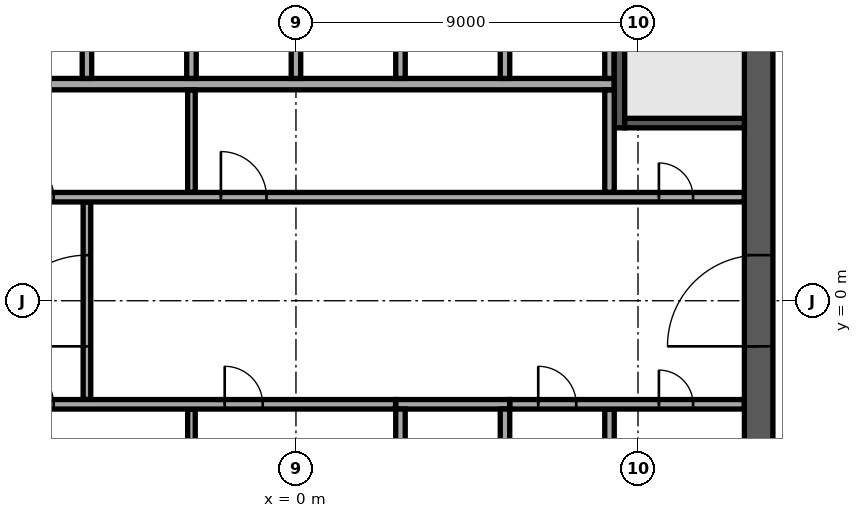
"""IFC4 building model, lengths in metres.
Left out: names, types, materials, properties, quantities, classifications, styles, units other than length and angle.
Written with IfcOpenShell. Run it as: python <this file> out.ifc"""

import sys

from ifc_helpers import new_model, si_unit, direction, frame, frame_2d, origin, place, context, subcontext, project, spatial, rectangle, extrude, element, fill, save


model = new_model("IFC4")
c1 = context("Model", 3, precision=1e-05, world=origin(), true_north=direction((0.0, 1.0)))
c2 = subcontext(c1, "Body", "Model", "MODEL_VIEW")
j1 = project(units=[si_unit("LENGTHUNIT", "METRE"), si_unit("PLANEANGLEUNIT", "RADIAN")], contexts=[c1])
p1 = place(None, origin())
s1 = spatial("IfcSite", under=j1, at=p1, CompositionType="ELEMENT")
p2 = place(p1, origin())
s2 = spatial("IfcBuilding", under=s1, at=p2, CompositionType="ELEMENT")
p3 = place(p2, frame((0.0, 0.0, 262.9)))
s3 = spatial("IfcBuildingStorey", under=s2, at=p3, CompositionType="ELEMENT", Elevation=262.9)
p4 = place(p3, frame((12.175, -11.8, 0.0), z_axis=(0.0, 0.0, 1.0), x_axis=(0.0, 1.0, 0.0)))
e1 = element("IfcWall", 1, at=p4, inside=s3, PredefinedType="SHEAR", context=c2, shape_type="SweptSolid", body=[
    extrude(rectangle(XDim=23.6, YDim=0.75, at=frame_2d((11.8, 0.0))), origin(), (0.0, 0.0, 1.0), 3.64),
])
p5 = place(p4, frame((10.6, 0.0, 0.0)))
e2 = element("IfcOpeningElement", 2, at=p5, cuts=e1, PredefinedType="OPENING", context=c2, shape_type="SweptSolid", body=[
    extrude(rectangle(XDim=2.4, YDim=2.4, at=frame_2d((1.2, 1.2))), frame((0.0, 0.385, 0.0), z_axis=(0.0, -1.0, 0.0), x_axis=(1.0, 0.0, 0.0)), (0.0, 0.0, 1.0), 0.77),
])
p6 = place(p3, frame((-8.375, 5.7, 0.0), z_axis=(0.0, 0.0, 1.0), x_axis=(1.0, 0.0, 0.0)))
e3 = element("IfcWall", 3, at=p6, inside=s3, PredefinedType="SOLIDWALL", context=c2, shape_type="SweptSolid", body=[
    extrude(rectangle(XDim=16.75, YDim=0.3, at=frame_2d((8.375, 0.0))), origin(), (0.0, 0.0, 1.0), 3.64),
])
for number, where, z_axis, x_axis in (
    (4, (-5.5, 5.85, 0.0), (0.0, 0.0, 1.0), (0.0, 1.0, 0.0)),
    (5, (-2.75, 5.85, 0.0), (0.0, 0.0, 1.0), (0.0, 1.0, 0.0)),
    (6, (0.0, 5.85, 0.0), (0.0, 0.0, 1.0), (0.0, 1.0, 0.0)),
    (7, (2.75, 5.85, 0.0), (0.0, 0.0, 1.0), (0.0, 1.0, 0.0)),
    (8, (5.5, 5.85, 0.0), (0.0, 0.0, 1.0), (0.0, 1.0, 0.0)),
    (9, (8.25, 5.85, 0.0), (0.0, 0.0, 1.0), (0.0, 1.0, 0.0)),
):
    element("IfcWall", number, at=place(p3, frame(where, z_axis=z_axis, x_axis=x_axis)), inside=s3, PredefinedType="SOLIDWALL", context=c2, shape_type="SweptSolid", body=[
        extrude(rectangle(XDim=2.7, YDim=0.25, at=frame_2d((1.35, 0.0))), origin(), (0.0, 0.0, 1.0), 3.64),
    ])
p7 = place(p3, frame((2.625, -2.725, 0.0), z_axis=(0.0, 0.0, 1.0), x_axis=(1.0, 0.0, 0.0)))
e10 = element("IfcWall", 10, at=p7, inside=s3, PredefinedType="SOLIDWALL", context=c2, shape_type="SweptSolid", body=[
    extrude(rectangle(XDim=3.0, YDim=0.25, at=frame_2d((1.5, 0.0))), origin(), (0.0, 0.0, 1.0), 3.64),
])
for number, where, z_axis, x_axis in (
    (11, (2.75, -5.55, 0.0), (0.0, 0.0, 1.0), (0.0, 1.0, 0.0)),
    (12, (5.5, -5.55, 0.0), (0.0, 0.0, 1.0), (0.0, 1.0, 0.0)),
):
    element("IfcWall", number, at=place(p3, frame(where, z_axis=z_axis, x_axis=x_axis)), inside=s3, PredefinedType="SOLIDWALL", context=c2, shape_type="SweptSolid", body=[
        extrude(rectangle(XDim=2.7, YDim=0.25, at=frame_2d((1.35, 0.0))), origin(), (0.0, 0.0, 1.0), 3.64),
    ])
p8 = place(p3, frame((8.512, 4.55, 0.0), z_axis=(0.0, 0.0, 1.0), x_axis=(0.0, 1.0, 0.0)))
e13 = element("IfcWall", 13, at=p8, inside=s3, PredefinedType="SOLIDWALL", context=c2, shape_type="SweptSolid", body=[
    extrude(rectangle(XDim=7.25, YDim=0.275, at=frame_2d((3.625, 0.0))), origin(), (0.0, 0.0, 1.0), 3.64),
])
p9 = place(p8, frame((6.0, 0.0, 0.0)))
e14 = element("IfcOpeningElement", 14, at=p9, cuts=e13, PredefinedType="OPENING", context=c2, shape_type="SweptSolid", body=[
    extrude(rectangle(XDim=1.0, YDim=2.1, at=frame_2d((0.5, 1.05))), frame((0.0, 0.147, 0.0), z_axis=(0.0, -1.0, 0.0), x_axis=(1.0, 0.0, 0.0)), (0.0, 0.0, 1.0), 0.295),
])
p10 = place(p3, frame((8.65, 4.675, 0.0), z_axis=(0.0, 0.0, 1.0), x_axis=(1.0, 0.0, 0.0)))
e15 = element("IfcWall", 15, at=p10, inside=s3, PredefinedType="SOLIDWALL", context=c2, shape_type="SweptSolid", body=[
    extrude(rectangle(XDim=3.15, YDim=0.25, at=frame_2d((1.575, 0.0))), origin(), (0.0, 0.0, 1.0), 3.64),
])
p11 = place(p3, frame((-2.75, -5.545, 0.0), z_axis=(0.0, 0.0, 1.0), x_axis=(0.0, 1.0, 0.0)))
e16 = element("IfcWall", 16, at=p11, inside=s3, PredefinedType="PARTITIONING", context=c2, shape_type="SweptSolid", body=[
    extrude(rectangle(XDim=2.69, YDim=0.2, at=frame_2d((1.345, 0.0))), origin(), (0.0, 0.0, 1.0), 3.64),
])
p12 = place(p3, frame((8.25, -5.545, 0.0), z_axis=(0.0, 0.0, 1.0), x_axis=(0.0, 1.0, 0.0)))
e17 = element("IfcWall", 17, at=p12, inside=s3, PredefinedType="PARTITIONING", context=c2, shape_type="SweptSolid", body=[
    extrude(rectangle(XDim=2.69, YDim=0.25, at=frame_2d((1.345, 0.0))), origin(), (0.0, 0.0, 1.0), 3.64),
])
p13 = place(p3, frame((-11.795, -2.725, 0.0), z_axis=(0.0, 0.0, 1.0), x_axis=(1.0, 0.0, 0.0)))
e18 = element("IfcWall", 18, at=p13, inside=s3, PredefinedType="PARTITIONING", context=c2, shape_type="SweptSolid", body=[
    extrude(rectangle(XDim=14.415, YDim=0.25, at=frame_2d((7.208, 0.0))), origin(), (0.0, 0.0, 1.0), 3.64),
])
p14 = place(p13, frame((1.295, 0.0, 0.0)))
e19 = element("IfcOpeningElement", 19, at=p14, cuts=e18, PredefinedType="OPENING", context=c2, shape_type="SweptSolid", body=[
    extrude(rectangle(XDim=1.0, YDim=2.1, at=frame_2d((0.5, 1.05))), frame((0.0, 0.135, 0.0), z_axis=(0.0, -1.0, 0.0), x_axis=(1.0, 0.0, 0.0)), (0.0, 0.0, 1.0), 0.27),
])
p15 = place(p13, frame((4.42, 0.0, 0.0)))
e20 = element("IfcOpeningElement", 20, at=p15, cuts=e18, PredefinedType="OPENING", context=c2, shape_type="SweptSolid", body=[
    extrude(rectangle(XDim=1.0, YDim=2.1, at=frame_2d((0.5, 1.05))), frame((0.0, 0.135, 0.0), z_axis=(0.0, -1.0, 0.0), x_axis=(1.0, 0.0, 0.0)), (0.0, 0.0, 1.0), 0.27),
])
p16 = place(p13, frame((9.92, 0.0, 0.0)))
e21 = element("IfcOpeningElement", 21, at=p16, cuts=e18, PredefinedType="OPENING", context=c2, shape_type="SweptSolid", body=[
    extrude(rectangle(XDim=1.0, YDim=2.1, at=frame_2d((0.5, 1.05))), frame((0.0, 0.135, 0.0), z_axis=(0.0, -1.0, 0.0), x_axis=(1.0, 0.0, 0.0)), (0.0, 0.0, 1.0), 0.27),
])
p17 = place(p3, frame((5.63, -2.725, 0.0), z_axis=(0.0, 0.0, 1.0), x_axis=(1.0, 0.0, 0.0)))
e22 = element("IfcWall", 22, at=p17, inside=s3, PredefinedType="PARTITIONING", context=c2, shape_type="SweptSolid", body=[
    extrude(rectangle(XDim=6.165, YDim=0.25, at=frame_2d((3.083, 0.0))), origin(), (0.0, 0.0, 1.0), 3.64),
])
p18 = place(p17, frame((0.745, 0.0, 0.0)))
e23 = element("IfcOpeningElement", 23, at=p18, cuts=e22, PredefinedType="OPENING", context=c2, shape_type="SweptSolid", body=[
    extrude(rectangle(XDim=1.0, YDim=2.1, at=frame_2d((0.5, 1.05))), frame((0.0, 0.135, 0.0), z_axis=(0.0, -1.0, 0.0), x_axis=(1.0, 0.0, 0.0)), (0.0, 0.0, 1.0), 0.27),
])
p19 = place(p17, frame((3.92, 0.0, 0.0)))
e24 = element("IfcOpeningElement", 24, at=p19, cuts=e22, PredefinedType="OPENING", context=c2, shape_type="SweptSolid", body=[
    extrude(rectangle(XDim=0.9, YDim=2.1, at=frame_2d((0.45, 1.05))), frame((0.0, 0.135, 0.0), z_axis=(0.0, -1.0, 0.0), x_axis=(1.0, 0.0, 0.0)), (0.0, 0.0, 1.0), 0.27),
])
p20 = place(p3, frame((-5.5, -2.595, 0.0), z_axis=(0.0, 0.0, 1.0), x_axis=(0.0, 1.0, 0.0)))
e25 = element("IfcWall", 25, at=p20, inside=s3, PredefinedType="PARTITIONING", context=c2, shape_type="SweptSolid", body=[
    extrude(rectangle(XDim=5.19, YDim=0.2, at=frame_2d((2.595, 0.0))), origin(), (0.0, 0.0, 1.0), 3.64),
])
p21 = place(p20, frame((1.395, 0.0, 0.0)))
e26 = element("IfcOpeningElement", 26, at=p21, cuts=e25, PredefinedType="OPENING", context=c2, shape_type="SweptSolid", body=[
    extrude(rectangle(XDim=2.4, YDim=2.4, at=frame_2d((1.2, 1.2))), frame((0.0, 0.11, 0.0), z_axis=(0.0, -1.0, 0.0), x_axis=(1.0, 0.0, 0.0)), (0.0, 0.0, 1.0), 0.22),
])
p22 = place(p3, frame((-11.795, 2.725, 0.0), z_axis=(0.0, 0.0, 1.0), x_axis=(1.0, 0.0, 0.0)))
e27 = element("IfcWall", 27, at=p22, inside=s3, PredefinedType="PARTITIONING", context=c2, shape_type="SweptSolid", body=[
    extrude(rectangle(XDim=23.59, YDim=0.25, at=frame_2d((11.795, 0.0))), origin(), (0.0, 0.0, 1.0), 3.64),
])
p23 = place(p22, frame((21.345, 0.0, 0.0)))
e28 = element("IfcOpeningElement", 28, at=p23, cuts=e27, PredefinedType="OPENING", context=c2, shape_type="SweptSolid", body=[
    extrude(rectangle(XDim=0.9, YDim=2.1, at=frame_2d((0.45, 1.05))), frame((0.0, 0.135, 0.0), z_axis=(0.0, -1.0, 0.0), x_axis=(1.0, 0.0, 0.0)), (0.0, 0.0, 1.0), 0.27),
])
p24 = place(p22, frame((1.345, 0.0, 0.0)))
e29 = element("IfcOpeningElement", 29, at=p24, cuts=e27, PredefinedType="OPENING", context=c2, shape_type="SweptSolid", body=[
    extrude(rectangle(XDim=0.9, YDim=2.1, at=frame_2d((0.45, 1.05))), frame((0.0, 0.135, 0.0), z_axis=(0.0, -1.0, 0.0), x_axis=(1.0, 0.0, 0.0)), (0.0, 0.0, 1.0), 0.27),
])
p25 = place(p22, frame((4.42, 0.0, 0.0)))
e30 = element("IfcOpeningElement", 30, at=p25, cuts=e27, PredefinedType="OPENING", context=c2, shape_type="SweptSolid", body=[
    extrude(rectangle(XDim=1.0, YDim=2.1, at=frame_2d((0.5, 1.05))), frame((0.0, 0.135, 0.0), z_axis=(0.0, -1.0, 0.0), x_axis=(1.0, 0.0, 0.0)), (0.0, 0.0, 1.0), 0.27),
])
p26 = place(p22, frame((9.82, 0.0, 0.0)))
e31 = element("IfcOpeningElement", 31, at=p26, cuts=e27, PredefinedType="OPENING", context=c2, shape_type="SweptSolid", body=[
    extrude(rectangle(XDim=1.2, YDim=2.1, at=frame_2d((0.6, 1.05))), frame((0.0, 0.135, 0.0), z_axis=(0.0, -1.0, 0.0), x_axis=(1.0, 0.0, 0.0)), (0.0, 0.0, 1.0), 0.27),
])
p27 = place(p3, frame((-2.75, 2.855, 0.0), z_axis=(0.0, 0.0, 1.0), x_axis=(0.0, 1.0, 0.0)))
e32 = element("IfcWall", 32, at=p27, inside=s3, PredefinedType="PARTITIONING", context=c2, shape_type="SweptSolid", body=[
    extrude(rectangle(XDim=2.69, YDim=0.2, at=frame_2d((1.345, 0.0))), origin(), (0.0, 0.0, 1.0), 3.64),
])
p28 = place(p3, frame((8.25, 2.855, 0.0), z_axis=(0.0, 0.0, 1.0), x_axis=(0.0, 1.0, 0.0)))
e33 = element("IfcWall", 33, at=p28, inside=s3, PredefinedType="PARTITIONING", context=c2, shape_type="SweptSolid", body=[
    extrude(rectangle(XDim=2.69, YDim=0.25, at=frame_2d((1.345, 0.0))), origin(), (0.0, 0.0, 1.0), 3.64),
])
p29 = place(p3, frame((8.094, -32.782, 0.0), z_axis=(0.0, 0.0, 1.0), x_axis=(0.499997945818, 0.866026589763, 0.0)))
e34 = element("IfcWall", 34, at=p29, inside=s3, PredefinedType="STANDARD", context=c2, shape_type="SweptSolid", body=[
    extrude(rectangle(XDim=48.686, YDim=0.6, at=frame_2d((24.343, 0.0))), origin(), (0.0, 0.0, 1.0), 3.64),
])
p30 = place(p29, frame((1.213, 0.0, 0.9)))
e35 = element("IfcOpeningElement", 35, at=p30, cuts=e34, PredefinedType="OPENING", context=c2, shape_type="SweptSolid", body=[
    extrude(rectangle(XDim=2.0, YDim=2.1, at=frame_2d((1.0, 1.05))), frame((0.0, 0.31, 0.0), z_axis=(0.0, -1.0, 0.0), x_axis=(1.0, 0.0, 0.0)), (0.0, 0.0, 1.0), 0.62),
])
p31 = place(p29, frame((5.639, 0.0, 0.9)))
e36 = element("IfcOpeningElement", 36, at=p31, cuts=e34, PredefinedType="OPENING", context=c2, shape_type="SweptSolid", body=[
    extrude(rectangle(XDim=2.0, YDim=2.1, at=frame_2d((1.0, 1.05))), frame((0.0, 0.31, 0.0), z_axis=(0.0, -1.0, 0.0), x_axis=(1.0, 0.0, 0.0)), (0.0, 0.0, 1.0), 0.62),
])
p32 = place(p29, frame((10.065, 0.0, 0.9)))
e37 = element("IfcOpeningElement", 37, at=p32, cuts=e34, PredefinedType="OPENING", context=c2, shape_type="SweptSolid", body=[
    extrude(rectangle(XDim=2.0, YDim=2.1, at=frame_2d((1.0, 1.05))), frame((0.0, 0.31, 0.0), z_axis=(0.0, -1.0, 0.0), x_axis=(1.0, 0.0, 0.0)), (0.0, 0.0, 1.0), 0.62),
])
p33 = place(p29, frame((14.491, 0.0, 0.9)))
e38 = element("IfcOpeningElement", 38, at=p33, cuts=e34, PredefinedType="OPENING", context=c2, shape_type="SweptSolid", body=[
    extrude(rectangle(XDim=2.0, YDim=2.1, at=frame_2d((1.0, 1.05))), frame((0.0, 0.31, 0.0), z_axis=(0.0, -1.0, 0.0), x_axis=(1.0, 0.0, 0.0)), (0.0, 0.0, 1.0), 0.62),
])
p34 = place(p29, frame((18.917, 0.0, 0.9)))
e39 = element("IfcOpeningElement", 39, at=p34, cuts=e34, PredefinedType="OPENING", context=c2, shape_type="SweptSolid", body=[
    extrude(rectangle(XDim=2.0, YDim=2.1, at=frame_2d((1.0, 1.05))), frame((0.0, 0.31, 0.0), z_axis=(0.0, -1.0, 0.0), x_axis=(1.0, 0.0, 0.0)), (0.0, 0.0, 1.0), 0.62),
])
p35 = place(p29, frame((23.343, 0.0, 0.9)))
e40 = element("IfcOpeningElement", 40, at=p35, cuts=e34, PredefinedType="OPENING", context=c2, shape_type="SweptSolid", body=[
    extrude(rectangle(XDim=2.0, YDim=2.1, at=frame_2d((1.0, 1.05))), frame((0.0, 0.31, 0.0), z_axis=(0.0, -1.0, 0.0), x_axis=(1.0, 0.0, 0.0)), (0.0, 0.0, 1.0), 0.62),
])
p36 = place(p29, frame((27.769, 0.0, 0.9)))
e41 = element("IfcOpeningElement", 41, at=p36, cuts=e34, PredefinedType="OPENING", context=c2, shape_type="SweptSolid", body=[
    extrude(rectangle(XDim=2.0, YDim=2.1, at=frame_2d((1.0, 1.05))), frame((0.0, 0.31, 0.0), z_axis=(0.0, -1.0, 0.0), x_axis=(1.0, 0.0, 0.0)), (0.0, 0.0, 1.0), 0.62),
])
p37 = place(p29, frame((32.195, 0.0, 0.9)))
e42 = element("IfcOpeningElement", 42, at=p37, cuts=e34, PredefinedType="OPENING", context=c2, shape_type="SweptSolid", body=[
    extrude(rectangle(XDim=2.0, YDim=2.1, at=frame_2d((1.0, 1.05))), frame((0.0, 0.31, 0.0), z_axis=(0.0, -1.0, 0.0), x_axis=(1.0, 0.0, 0.0)), (0.0, 0.0, 1.0), 0.62),
])
p38 = place(p29, frame((36.621, 0.0, 0.9)))
e43 = element("IfcOpeningElement", 43, at=p38, cuts=e34, PredefinedType="OPENING", context=c2, shape_type="SweptSolid", body=[
    extrude(rectangle(XDim=2.0, YDim=2.1, at=frame_2d((1.0, 1.05))), frame((0.0, 0.31, 0.0), z_axis=(0.0, -1.0, 0.0), x_axis=(1.0, 0.0, 0.0)), (0.0, 0.0, 1.0), 0.62),
])
p39 = place(p29, frame((41.047, 0.0, 0.9)))
e44 = element("IfcOpeningElement", 44, at=p39, cuts=e34, PredefinedType="OPENING", context=c2, shape_type="SweptSolid", body=[
    extrude(rectangle(XDim=2.0, YDim=2.1, at=frame_2d((1.0, 1.05))), frame((0.0, 0.31, 0.0), z_axis=(0.0, -1.0, 0.0), x_axis=(1.0, 0.0, 0.0)), (0.0, 0.0, 1.0), 0.62),
])
p40 = place(p29, frame((45.473, 0.0, 0.9)))
e45 = element("IfcOpeningElement", 45, at=p40, cuts=e34, PredefinedType="OPENING", context=c2, shape_type="SweptSolid", body=[
    extrude(rectangle(XDim=2.0, YDim=2.1, at=frame_2d((1.0, 1.05))), frame((0.0, 0.31, 0.0), z_axis=(0.0, -1.0, 0.0), x_axis=(1.0, 0.0, 0.0)), (0.0, 0.0, 1.0), 0.62),
])
p41 = place(p5, origin())
e46 = element("IfcDoor", 46, at=p41, inside=s3, OperationType="SINGLE_SWING_LEFT", PredefinedType="DOOR", context=c2, shape_type="SweptSolid", body=[
    extrude(rectangle(XDim=2.4, YDim=2.4, at=frame_2d((1.2, 1.2))), frame((0.0, 0.025, 0.0), z_axis=(0.0, -1.0, 0.0), x_axis=(1.0, 0.0, 0.0)), (0.0, 0.0, 1.0), 0.05),
])
fill(e2, e46)
p42 = place(p18, origin())
e47 = element("IfcDoor", 47, at=p42, inside=s3, OperationType="SINGLE_SWING_LEFT", PredefinedType="DOOR", context=c2, shape_type="SweptSolid", body=[
    extrude(rectangle(XDim=1.0, YDim=2.1, at=frame_2d((0.5, 1.05))), frame((0.0, 0.025, 0.0), z_axis=(0.0, -1.0, 0.0), x_axis=(1.0, 0.0, 0.0)), (0.0, 0.0, 1.0), 0.05),
])
fill(e23, e47)
p43 = place(p23, origin())
e48 = element("IfcDoor", 48, at=p43, inside=s3, OperationType="SINGLE_SWING_LEFT", PredefinedType="DOOR", context=c2, shape_type="SweptSolid", body=[
    extrude(rectangle(XDim=0.9, YDim=2.1, at=frame_2d((0.45, 1.05))), frame((0.0, 0.025, 0.0), z_axis=(0.0, -1.0, 0.0), x_axis=(1.0, 0.0, 0.0)), (0.0, 0.0, 1.0), 0.05),
])
fill(e28, e48)
p44 = place(p19, origin())
e49 = element("IfcDoor", 49, at=p44, inside=s3, OperationType="SINGLE_SWING_LEFT", PredefinedType="DOOR", context=c2, shape_type="SweptSolid", body=[
    extrude(rectangle(XDim=0.9, YDim=2.1, at=frame_2d((0.45, 1.05))), frame((0.0, 0.025, 0.0), z_axis=(0.0, -1.0, 0.0), x_axis=(1.0, 0.0, 0.0)), (0.0, 0.0, 1.0), 0.05),
])
fill(e24, e49)
p45 = place(p25, origin())
e50 = element("IfcDoor", 50, at=p45, inside=s3, OperationType="SINGLE_SWING_LEFT", PredefinedType="DOOR", context=c2, shape_type="SweptSolid", body=[
    extrude(rectangle(XDim=1.0, YDim=2.1, at=frame_2d((0.5, 1.05))), frame((0.0, 0.025, 0.0), z_axis=(0.0, -1.0, 0.0), x_axis=(1.0, 0.0, 0.0)), (0.0, 0.0, 1.0), 0.05),
])
fill(e30, e50)
p46 = place(p26, origin())
e51 = element("IfcDoor", 51, at=p46, inside=s3, OperationType="SINGLE_SWING_LEFT", PredefinedType="DOOR", context=c2, shape_type="SweptSolid", body=[
    extrude(rectangle(XDim=1.2, YDim=2.1, at=frame_2d((0.6, 1.05))), frame((0.0, 0.025, 0.0), z_axis=(0.0, -1.0, 0.0), x_axis=(1.0, 0.0, 0.0)), (0.0, 0.0, 1.0), 0.05),
])
fill(e31, e51)
p47 = place(p15, origin())
e52 = element("IfcDoor", 52, at=p47, inside=s3, OperationType="SINGLE_SWING_LEFT", PredefinedType="DOOR", context=c2, shape_type="SweptSolid", body=[
    extrude(rectangle(XDim=1.0, YDim=2.1, at=frame_2d((0.5, 1.05))), frame((0.0, 0.025, 0.0), z_axis=(0.0, -1.0, 0.0), x_axis=(1.0, 0.0, 0.0)), (0.0, 0.0, 1.0), 0.05),
])
fill(e20, e52)
p48 = place(p16, origin())
e53 = element("IfcDoor", 53, at=p48, inside=s3, OperationType="SINGLE_SWING_LEFT", PredefinedType="DOOR", context=c2, shape_type="SweptSolid", body=[
    extrude(rectangle(XDim=1.0, YDim=2.1, at=frame_2d((0.5, 1.05))), frame((0.0, 0.025, 0.0), z_axis=(0.0, -1.0, 0.0), x_axis=(1.0, 0.0, 0.0)), (0.0, 0.0, 1.0), 0.05),
])
fill(e21, e53)
p49 = place(p21, origin())
e54 = element("IfcDoor", 54, at=p49, inside=s3, OperationType="SINGLE_SWING_LEFT", PredefinedType="DOOR", context=c2, shape_type="SweptSolid", body=[
    extrude(rectangle(XDim=2.4, YDim=2.4, at=frame_2d((1.2, 1.2))), frame((0.0, 0.025, 0.0), z_axis=(0.0, -1.0, 0.0), x_axis=(1.0, 0.0, 0.0)), (0.0, 0.0, 1.0), 0.05),
])
fill(e26, e54)
save(model, sys.argv[1])
